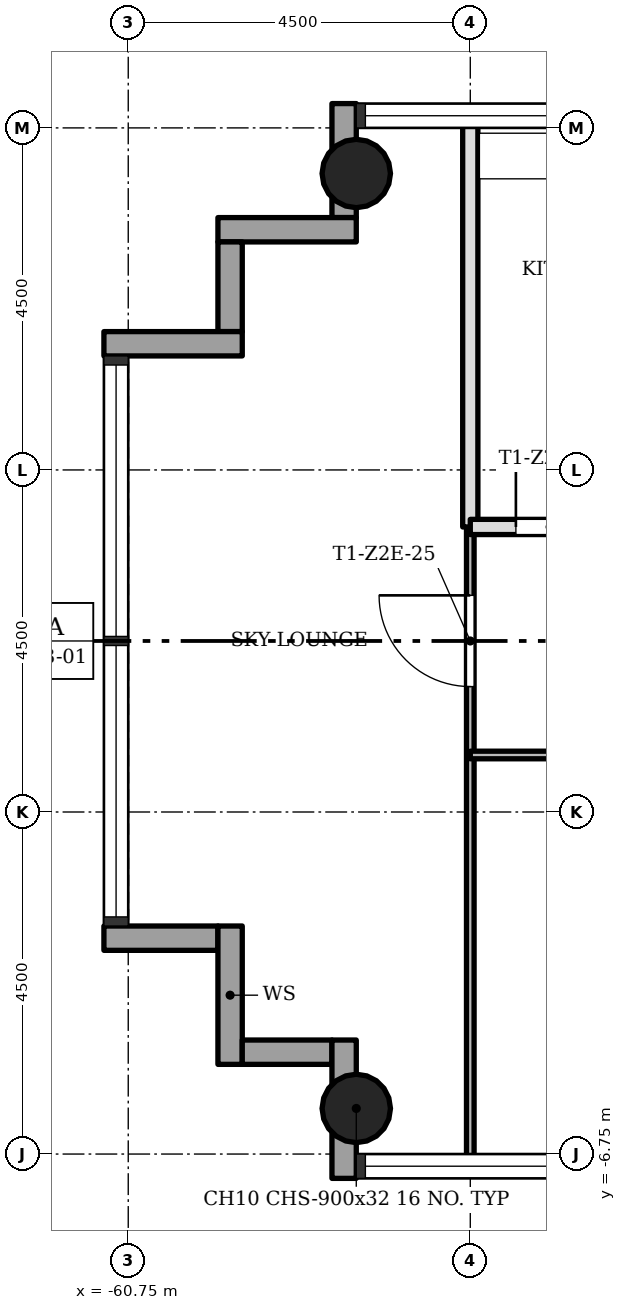
"""IFC4 building model, lengths in metres.
Left out: names, types, materials, properties, quantities, classifications, styles, units other than length and angle.
Written with IfcOpenShell. Run it as: python <this file> out.ifc"""

import sys

from ifc_helpers import new_model, si_unit, direction, frame, frame_2d, origin, origin_2d, place, context, subcontext, project, spatial, rectangle, hollow_circle, extrude, element, fill, save


model = new_model("IFC4")
c1 = context("Model", 3, precision=1e-05, world=origin(), true_north=direction((0.0, 1.0)))
c2 = subcontext(c1, "Body", "Model", "MODEL_VIEW")
j1 = project(units=[si_unit("LENGTHUNIT", "METRE"), si_unit("PLANEANGLEUNIT", "RADIAN")], contexts=[c1])
p1 = place(None, origin())
s1 = spatial("IfcSite", under=j1, at=p1, CompositionType="ELEMENT")
p2 = place(p1, origin())
s2 = spatial("IfcBuilding", under=s1, at=p2, CompositionType="ELEMENT")
p3 = place(p2, frame((0.0, 0.0, 97.0)))
s3 = spatial("IfcBuildingStorey", under=s2, at=p3, CompositionType="ELEMENT", Elevation=97.0)
for number, where, z_axis, x_axis in (
    (1, (-57.75, -6.15, 0.0), (0.0, 0.0, 1.0), (1.0, 0.0, 0.0)),
    (2, (-57.75, 6.15, 0.0), (0.0, 0.0, 1.0), (1.0, 0.0, 0.0)),
):
    element("IfcColumn", number, at=place(p3, frame(where, z_axis=z_axis, x_axis=x_axis)), inside=s3, PredefinedType="COLUMN", context=c2, shape_type="SweptSolid", body=[
        extrude(hollow_circle(Radius=0.45, WallThickness=0.032, at=origin_2d()), origin(), (0.0, 0.0, 1.0), 3.4),
    ])
p4 = place(p3, frame((-61.07, -3.91, -0.3), z_axis=(0.0, 0.0, 1.0), x_axis=(1.0, 0.0, 0.0)))
e3 = element("IfcWall", 3, at=p4, inside=s3, PredefinedType="STANDARD", context=c2, shape_type="SweptSolid", body=[
    extrude(rectangle(XDim=1.5, YDim=0.32, at=frame_2d((0.75, 0.0))), origin(), (0.0, 0.0, 1.0), 3.4),
])
p5 = place(p3, frame((-59.41, -3.75, -0.3), z_axis=(0.0, 0.0, 1.0), x_axis=(0.0, -1.0, 0.0)))
e4 = element("IfcWall", 4, at=p5, inside=s3, PredefinedType="STANDARD", context=c2, shape_type="SweptSolid", body=[
    extrude(rectangle(XDim=1.82, YDim=0.32, at=frame_2d((0.91, 0.0))), origin(), (0.0, 0.0, 1.0), 3.4),
])
p6 = place(p3, frame((-59.25, -5.41, -0.3), z_axis=(0.0, 0.0, 1.0), x_axis=(1.0, 0.0, 0.0)))
e5 = element("IfcWall", 5, at=p6, inside=s3, PredefinedType="STANDARD", context=c2, shape_type="SweptSolid", body=[
    extrude(rectangle(XDim=1.18, YDim=0.32, at=frame_2d((0.59, 0.0))), origin(), (0.0, 0.0, 1.0), 3.4),
])
p7 = place(p3, frame((-57.91, -5.25, -0.3), z_axis=(0.0, 0.0, 1.0), x_axis=(0.0, -1.0, 0.0)))
e6 = element("IfcWall", 6, at=p7, inside=s3, PredefinedType="STANDARD", context=c2, shape_type="SweptSolid", body=[
    extrude(rectangle(XDim=1.82, YDim=0.32, at=frame_2d((0.91, 0.0))), origin(), (0.0, 0.0, 1.0), 3.4),
])
p8 = place(p3, frame((-57.91, 7.07, -0.3), z_axis=(0.0, 0.0, 1.0), x_axis=(0.0, -1.0, 0.0)))
e7 = element("IfcWall", 7, at=p8, inside=s3, PredefinedType="STANDARD", context=c2, shape_type="SweptSolid", body=[
    extrude(rectangle(XDim=1.5, YDim=0.32, at=frame_2d((0.75, 0.0))), origin(), (0.0, 0.0, 1.0), 3.4),
])
p9 = place(p3, frame((-57.75, 5.41, -0.3), z_axis=(0.0, 0.0, 1.0), x_axis=(-1.0, 0.0, 0.0)))
e8 = element("IfcWall", 8, at=p9, inside=s3, PredefinedType="STANDARD", context=c2, shape_type="SweptSolid", body=[
    extrude(rectangle(XDim=1.82, YDim=0.32, at=frame_2d((0.91, 0.0))), origin(), (0.0, 0.0, 1.0), 3.4),
])
p10 = place(p3, frame((-59.41, 5.25, -0.3), z_axis=(0.0, 0.0, 1.0), x_axis=(0.0, -1.0, 0.0)))
e9 = element("IfcWall", 9, at=p10, inside=s3, PredefinedType="STANDARD", context=c2, shape_type="SweptSolid", body=[
    extrude(rectangle(XDim=1.18, YDim=0.32, at=frame_2d((0.59, 0.0))), origin(), (0.0, 0.0, 1.0), 3.4),
])
p11 = place(p3, frame((-59.25, 3.91, -0.3), z_axis=(0.0, 0.0, 1.0), x_axis=(-1.0, 0.0, 0.0)))
e10 = element("IfcWall", 10, at=p11, inside=s3, PredefinedType="STANDARD", context=c2, shape_type="SweptSolid", body=[
    extrude(rectangle(XDim=1.82, YDim=0.32, at=frame_2d((0.91, 0.0))), origin(), (0.0, 0.0, 1.0), 3.4),
])
p12 = place(p3, frame((-56.25, -6.85, 0.0), z_axis=(0.0, 0.0, 1.0), x_axis=(0.0, 1.0, 0.0)))
e11 = element("IfcWall", 11, at=p12, inside=s3, PredefinedType="PARTITIONING", context=c2, shape_type="SweptSolid", body=[
    extrude(rectangle(XDim=8.35, YDim=0.1, at=frame_2d((4.175, 0.0))), origin(), (0.0, 0.0, 1.0), 3.0),
])
p13 = place(p12, frame((6.25, 0.0, 0.0)))
e12 = element("IfcOpeningElement", 12, at=p13, cuts=e11, PredefinedType="OPENING", context=c2, shape_type="SweptSolid", body=[
    extrude(rectangle(XDim=1.2, YDim=2.1, at=frame_2d((0.6, 1.05))), frame((0.0, 0.06, 0.0), z_axis=(0.0, -1.0, 0.0), x_axis=(1.0, 0.0, 0.0)), (0.0, 0.0, 1.0), 0.12),
])
p14 = place(p3, frame((-56.25, 1.5, 0.0), z_axis=(0.0, 0.0, 1.0), x_axis=(0.0, 1.0, 0.0)))
e13 = element("IfcWall", 13, at=p14, inside=s3, PredefinedType="SOLIDWALL", context=c2, shape_type="SweptSolid", body=[
    extrude(rectangle(XDim=5.35, YDim=0.2, at=frame_2d((2.675, 0.0))), origin(), (0.0, 0.0, 1.0), 3.0),
])
p15 = place(p3, frame((-56.25, -1.5, 0.0), z_axis=(0.0, 0.0, 1.0), x_axis=(1.0, 0.0, 0.0)))
e14 = element("IfcWall", 14, at=p15, inside=s3, PredefinedType="PARTITIONING", context=c2, shape_type="SweptSolid", body=[
    extrude(rectangle(XDim=4.5, YDim=0.1, at=frame_2d((2.25, 0.0))), origin(), (0.0, 0.0, 1.0), 3.0),
])
p16 = place(p15, frame((1.8, 0.0, 0.0)))
e15 = element("IfcOpeningElement", 15, at=p16, cuts=e14, PredefinedType="OPENING", context=c2, shape_type="SweptSolid", body=[
    extrude(rectangle(XDim=0.9, YDim=2.1, at=frame_2d((0.45, 1.05))), frame((0.0, 0.06, 0.0), z_axis=(0.0, -1.0, 0.0), x_axis=(1.0, 0.0, 0.0)), (0.0, 0.0, 1.0), 0.12),
])
p17 = place(p3, frame((-56.25, 1.5, 0.0), z_axis=(0.0, 0.0, 1.0), x_axis=(1.0, 0.0, 0.0)))
e16 = element("IfcWall", 16, at=p17, inside=s3, PredefinedType="SOLIDWALL", context=c2, shape_type="SweptSolid", body=[
    extrude(rectangle(XDim=4.5, YDim=0.2, at=frame_2d((2.25, 0.0))), origin(), (0.0, 0.0, 1.0), 3.0),
])
p18 = place(p17, frame((0.6, 0.0, 0.0)))
e17 = element("IfcOpeningElement", 17, at=p18, cuts=e16, PredefinedType="OPENING", context=c2, shape_type="SweptSolid", body=[
    extrude(rectangle(XDim=0.9, YDim=2.1, at=frame_2d((0.45, 1.05))), frame((0.0, 0.11, 0.0), z_axis=(0.0, -1.0, 0.0), x_axis=(1.0, 0.0, 0.0)), (0.0, 0.0, 1.0), 0.22),
])
p19 = place(p18, origin())
e18 = element("IfcDoor", 18, at=p19, inside=s3, OperationType="SINGLE_SWING_RIGHT", PredefinedType="DOOR", context=c2, shape_type="SweptSolid", body=[
    extrude(rectangle(XDim=0.9, YDim=2.1, at=frame_2d((0.45, 1.05))), frame((0.0, 0.025, 0.0), z_axis=(0.0, -1.0, 0.0), x_axis=(1.0, 0.0, 0.0)), (0.0, 0.0, 1.0), 0.05),
])
fill(e17, e18)
p20 = place(p13, origin())
e19 = element("IfcDoor", 19, at=p20, inside=s3, OperationType="SINGLE_SWING_LEFT", PredefinedType="DOOR", context=c2, shape_type="SweptSolid", body=[
    extrude(rectangle(XDim=1.2, YDim=2.1, at=frame_2d((0.6, 1.05))), frame((0.0, 0.025, 0.0), z_axis=(0.0, -1.0, 0.0), x_axis=(1.0, 0.0, 0.0)), (0.0, 0.0, 1.0), 0.05),
])
fill(e12, e19)
save(model, sys.argv[1])
